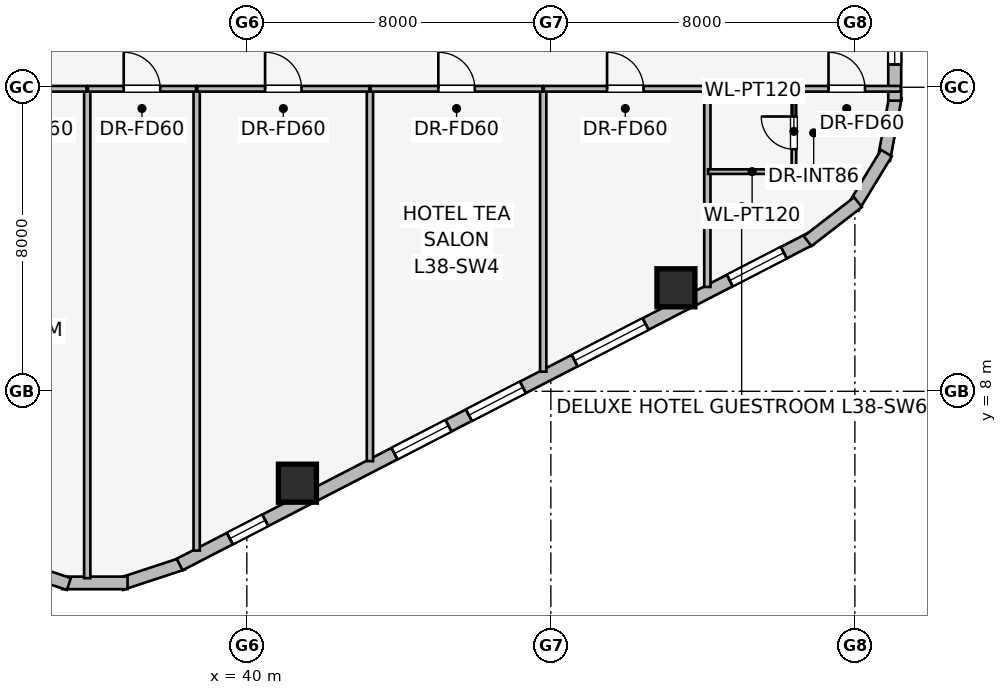
"""IFC4 building model, lengths in metres.
Left out: names, types, materials, properties, quantities, classifications, styles, units other than length and angle.
Written with IfcOpenShell. Run it as: python <this file> out.ifc"""

import sys

from ifc_helpers import new_model, si_unit, direction, frame, frame_2d, origin, origin_2d, place, context, subcontext, project, spatial, rectangle, extrude, element, fill, save


model = new_model("IFC4")
c1 = context("Model", 3, precision=1e-05, world=origin(), true_north=direction((0.0, 1.0)))
c2 = subcontext(c1, "Body", "Model", "MODEL_VIEW")
j1 = project(units=[si_unit("LENGTHUNIT", "METRE"), si_unit("PLANEANGLEUNIT", "RADIAN")], contexts=[c1])
p1 = place(None, origin())
s1 = spatial("IfcSite", under=j1, at=p1, CompositionType="ELEMENT")
p2 = place(p1, origin())
s2 = spatial("IfcBuilding", under=s1, at=p2, CompositionType="ELEMENT")
p3 = place(p2, frame((0.0, 0.0, 142.95)))
s3 = spatial("IfcBuildingStorey", under=s2, at=p3, CompositionType="ELEMENT", Elevation=142.95)
for number, where, z_axis, x_axis in (
    (1, (41.331, 5.582, 0.0), (0.0, 0.0, 1.0), (1.0, 0.0, 0.0)),
    (2, (51.291, 10.723, 0.0), (0.0, 0.0, 1.0), (1.0, 0.0, 0.0)),
):
    element("IfcColumn", number, at=place(p3, frame(where, z_axis=z_axis, x_axis=x_axis)), inside=s3, PredefinedType="COLUMN", context=c2, shape_type="SweptSolid", body=[
        extrude(rectangle(XDim=1.0, YDim=1.0, at=origin_2d()), origin(), (0.0, 0.0, 1.0), 3.45),
    ])
for number, where, z_axis, x_axis in (
    (3, (38.319, 3.468, 0.0), (0.0, 0.0, 1.0), (-0.95, -0.312, 0.0)),
    (4, (36.861, 2.959, 0.0), (0.0, 0.0, 1.0), (-1.0, 0.0, 0.0)),
    (5, (35.317, 2.93, 0.0), (0.0, 0.0, 1.0), (-0.95, 0.312, 0.0)),
):
    element("IfcWall", number, at=place(p3, frame(where, z_axis=z_axis, x_axis=x_axis)), inside=s3, PredefinedType="STANDARD", context=c2, shape_type="SweptSolid", body=[
        extrude(rectangle(XDim=1.722, YDim=0.33, at=frame_2d((0.861, 0.0))), origin(), (0.0, 0.0, 1.0), 3.16),
    ])
p4 = place(p3, frame((54.831, 12.01, 0.0), z_axis=(0.0, 0.0, 1.0), x_axis=(-0.888613612362, -0.458656568606, 0.0)))
e6 = element("IfcWall", 6, at=p4, inside=s3, PredefinedType="STANDARD", context=c2, shape_type="SweptSolid", body=[
    extrude(rectangle(XDim=18.681, YDim=0.34, at=frame_2d((9.34, 0.0))), origin(), (0.0, 0.0, 1.0), 3.16),
])
p5 = place(p4, frame((0.789, 0.0, 0.75)))
e7 = element("IfcOpeningElement", 7, at=p5, cuts=e6, PredefinedType="OPENING", context=c2, shape_type="SweptSolid", body=[
    extrude(rectangle(XDim=1.6, YDim=1.55, at=frame_2d((0.8, 0.775))), frame((0.0, 0.18, 0.0), z_axis=(0.0, -1.0, 0.0), x_axis=(1.0, 0.0, 0.0)), (0.0, 0.0, 1.0), 0.36),
])
p6 = place(p4, frame((4.882, 0.0, 0.75)))
e8 = element("IfcOpeningElement", 8, at=p6, cuts=e6, PredefinedType="OPENING", context=c2, shape_type="SweptSolid", body=[
    extrude(rectangle(XDim=2.1, YDim=1.5, at=frame_2d((1.05, 0.75))), frame((0.0, 0.18, 0.0), z_axis=(0.0, -1.0, 0.0), x_axis=(1.0, 0.0, 0.0)), (0.0, 0.0, 1.0), 0.36),
])
p7 = place(p4, frame((8.515, 0.0, 0.75)))
e9 = element("IfcOpeningElement", 9, at=p7, cuts=e6, PredefinedType="OPENING", context=c2, shape_type="SweptSolid", body=[
    extrude(rectangle(XDim=1.6, YDim=1.55, at=frame_2d((0.8, 0.775))), frame((0.0, 0.18, 0.0), z_axis=(0.0, -1.0, 0.0), x_axis=(1.0, 0.0, 0.0)), (0.0, 0.0, 1.0), 0.36),
])
p8 = place(p4, frame((10.719, 0.0, 0.75)))
e10 = element("IfcOpeningElement", 10, at=p8, cuts=e6, PredefinedType="OPENING", context=c2, shape_type="SweptSolid", body=[
    extrude(rectangle(XDim=1.6, YDim=1.55, at=frame_2d((0.8, 0.775))), frame((0.0, 0.18, 0.0), z_axis=(0.0, -1.0, 0.0), x_axis=(1.0, 0.0, 0.0)), (0.0, 0.0, 1.0), 0.36),
])
p9 = place(p4, frame((16.143, 0.0, 0.75)))
e11 = element("IfcOpeningElement", 11, at=p9, cuts=e6, PredefinedType="OPENING", context=c2, shape_type="SweptSolid", body=[
    extrude(rectangle(XDim=1.05, YDim=1.4, at=frame_2d((0.525, 0.7))), frame((0.0, 0.18, 0.0), z_axis=(0.0, -1.0, 0.0), x_axis=(1.0, 0.0, 0.0)), (0.0, 0.0, 1.0), 0.36),
])
p10 = place(p3, frame((57.068, 15.742, 0.0), z_axis=(0.0, 0.0, 1.0), x_axis=(-0.181984991895, -0.983301308209, 0.0)))
e12 = element("IfcWall", 12, at=p10, inside=s3, PredefinedType="STANDARD", context=c2, shape_type="SweptSolid", body=[
    extrude(rectangle(XDim=1.677, YDim=0.33, at=frame_2d((0.838, 0.0))), origin(), (0.0, 0.0, 1.0), 3.16),
])
p11 = place(p3, frame((56.83, 14.268, 0.0), z_axis=(0.0, 0.0, 1.0), x_axis=(-0.520519429557, -0.853849824883, 0.0)))
e13 = element("IfcWall", 13, at=p11, inside=s3, PredefinedType="STANDARD", context=c2, shape_type="SweptSolid", body=[
    extrude(rectangle(XDim=1.677, YDim=0.33, at=frame_2d((0.839, 0.0))), origin(), (0.0, 0.0, 1.0), 3.16),
])
p12 = place(p3, frame((56.082, 12.976, 0.0), z_axis=(0.0, 0.0, 1.0), x_axis=(-0.790621329885, -0.612305408053, 0.0)))
e14 = element("IfcWall", 14, at=p12, inside=s3, PredefinedType="STANDARD", context=c2, shape_type="SweptSolid", body=[
    extrude(rectangle(XDim=1.676, YDim=0.33, at=frame_2d((0.838, 0.0))), origin(), (0.0, 0.0, 1.0), 3.16),
])
p13 = place(p3, frame((57.048, 32.352, 0.0), z_axis=(0.0, 0.0, 1.0), x_axis=(0.0, -1.0, 0.0)))
e15 = element("IfcWall", 15, at=p13, inside=s3, PredefinedType="STANDARD", context=c2, shape_type="SweptSolid", body=[
    extrude(rectangle(XDim=16.704, YDim=0.34, at=frame_2d((8.352, 0.0))), origin(), (0.0, 0.0, 1.0), 3.16),
])
p14 = place(p13, frame((0.992, 0.0, 0.75)))
e16 = element("IfcOpeningElement", 16, at=p14, cuts=e15, PredefinedType="OPENING", context=c2, shape_type="SweptSolid", body=[
    extrude(rectangle(XDim=1.05, YDim=1.4, at=frame_2d((0.525, 0.7))), frame((0.0, 0.18, 0.0), z_axis=(0.0, -1.0, 0.0), x_axis=(1.0, 0.0, 0.0)), (0.0, 0.0, 1.0), 0.36),
])
p15 = place(p13, frame((4.935, 0.0, 0.75)))
e17 = element("IfcOpeningElement", 17, at=p15, cuts=e15, PredefinedType="OPENING", context=c2, shape_type="SweptSolid", body=[
    extrude(rectangle(XDim=2.1, YDim=1.5, at=frame_2d((1.05, 0.75))), frame((0.0, 0.18, 0.0), z_axis=(0.0, -1.0, 0.0), x_axis=(1.0, 0.0, 0.0)), (0.0, 0.0, 1.0), 0.36),
])
p16 = place(p13, frame((9.919, 0.0, 0.75)))
e18 = element("IfcOpeningElement", 18, at=p16, cuts=e15, PredefinedType="OPENING", context=c2, shape_type="SweptSolid", body=[
    extrude(rectangle(XDim=1.6, YDim=1.55, at=frame_2d((0.8, 0.775))), frame((0.0, 0.18, 0.0), z_axis=(0.0, -1.0, 0.0), x_axis=(1.0, 0.0, 0.0)), (0.0, 0.0, 1.0), 0.36),
])
p17 = place(p13, frame((14.702, 0.0, 0.75)))
e19 = element("IfcOpeningElement", 19, at=p17, cuts=e15, PredefinedType="OPENING", context=c2, shape_type="SweptSolid", body=[
    extrude(rectangle(XDim=1.05, YDim=1.4, at=frame_2d((0.525, 0.7))), frame((0.0, 0.18, 0.0), z_axis=(0.0, -1.0, 0.0), x_axis=(1.0, 0.0, 0.0)), (0.0, 0.0, 1.0), 0.36),
])
p18 = place(p3, frame((35.8, 3.084, 0.0), z_axis=(0.0, 0.0, 1.0), x_axis=(0.0, 1.0, 0.0)))
e20 = element("IfcWall", 20, at=p18, inside=s3, PredefinedType="PARTITIONING", context=c2, shape_type="SweptSolid", body=[
    extrude(rectangle(XDim=12.846, YDim=0.165, at=frame_2d((6.423, 0.0))), origin(), (0.0, 0.0, 1.0), 3.16),
])
p19 = place(p3, frame((38.68, 3.809, 0.0), z_axis=(0.0, 0.0, 1.0), x_axis=(0.0, 1.0, 0.0)))
e21 = element("IfcWall", 21, at=p19, inside=s3, PredefinedType="PARTITIONING", context=c2, shape_type="SweptSolid", body=[
    extrude(rectangle(XDim=12.121, YDim=0.165, at=frame_2d((6.061, 0.0))), origin(), (0.0, 0.0, 1.0), 3.16),
])
p20 = place(p3, frame((43.239, 6.162, 0.0), z_axis=(0.0, 0.0, 1.0), x_axis=(0.0, 1.0, 0.0)))
e22 = element("IfcWall", 22, at=p20, inside=s3, PredefinedType="PARTITIONING", context=c2, shape_type="SweptSolid", body=[
    extrude(rectangle(XDim=9.768, YDim=0.165, at=frame_2d((4.884, 0.0))), origin(), (0.0, 0.0, 1.0), 3.16),
])
p21 = place(p3, frame((47.799, 8.516, 0.0), z_axis=(0.0, 0.0, 1.0), x_axis=(0.0, 1.0, 0.0)))
e23 = element("IfcWall", 23, at=p21, inside=s3, PredefinedType="PARTITIONING", context=c2, shape_type="SweptSolid", body=[
    extrude(rectangle(XDim=7.414, YDim=0.165, at=frame_2d((3.707, 0.0))), origin(), (0.0, 0.0, 1.0), 3.16),
])
p22 = place(p3, frame((52.118, 10.745, 0.0), z_axis=(0.0, 0.0, 1.0), x_axis=(0.0, 1.0, 0.0)))
e24 = element("IfcWall", 24, at=p22, inside=s3, PredefinedType="PARTITIONING", context=c2, shape_type="SweptSolid", body=[
    extrude(rectangle(XDim=5.185, YDim=0.165, at=frame_2d((2.592, 0.0))), origin(), (0.0, 0.0, 1.0), 3.16),
])
p23 = place(p3, frame((32.85, 15.96, 0.0), z_axis=(0.0, 0.0, 1.0), x_axis=(1.0, 0.0, 0.0)))
e25 = element("IfcWall", 25, at=p23, inside=s3, PredefinedType="PARTITIONING", context=c2, shape_type="SweptSolid", body=[
    extrude(rectangle(XDim=2.932, YDim=0.15, at=frame_2d((1.466, 0.0))), origin(), (0.0, 0.0, 1.0), 3.16),
])
p24 = place(p23, frame((0.986, 0.0, 0.0)))
e26 = element("IfcOpeningElement", 26, at=p24, cuts=e25, PredefinedType="OPENING", context=c2, shape_type="SweptSolid", body=[
    extrude(rectangle(XDim=0.96, YDim=2.0, at=frame_2d((0.48, 1.0))), frame((0.0, 0.085, 0.0), z_axis=(0.0, -1.0, 0.0), x_axis=(1.0, 0.0, 0.0)), (0.0, 0.0, 1.0), 0.17),
])
p25 = place(p3, frame((35.818, 15.96, 0.0), z_axis=(0.0, 0.0, 1.0), x_axis=(1.0, 0.0, 0.0)))
e27 = element("IfcWall", 27, at=p25, inside=s3, PredefinedType="PARTITIONING", context=c2, shape_type="SweptSolid", body=[
    extrude(rectangle(XDim=2.844, YDim=0.15, at=frame_2d((1.422, 0.0))), origin(), (0.0, 0.0, 1.0), 3.16),
])
p26 = place(p25, frame((0.942, 0.0, 0.0)))
e28 = element("IfcOpeningElement", 28, at=p26, cuts=e27, PredefinedType="OPENING", context=c2, shape_type="SweptSolid", body=[
    extrude(rectangle(XDim=0.96, YDim=2.0, at=frame_2d((0.48, 1.0))), frame((0.0, 0.085, 0.0), z_axis=(0.0, -1.0, 0.0), x_axis=(1.0, 0.0, 0.0)), (0.0, 0.0, 1.0), 0.17),
])
p27 = place(p3, frame((38.698, 15.96, 0.0), z_axis=(0.0, 0.0, 1.0), x_axis=(1.0, 0.0, 0.0)))
e29 = element("IfcWall", 29, at=p27, inside=s3, PredefinedType="PARTITIONING", context=c2, shape_type="SweptSolid", body=[
    extrude(rectangle(XDim=4.523, YDim=0.15, at=frame_2d((2.261, 0.0))), origin(), (0.0, 0.0, 1.0), 3.16),
])
p28 = place(p27, frame((1.782, 0.0, 0.0)))
e30 = element("IfcOpeningElement", 30, at=p28, cuts=e29, PredefinedType="OPENING", context=c2, shape_type="SweptSolid", body=[
    extrude(rectangle(XDim=0.96, YDim=2.0, at=frame_2d((0.48, 1.0))), frame((0.0, 0.085, 0.0), z_axis=(0.0, -1.0, 0.0), x_axis=(1.0, 0.0, 0.0)), (0.0, 0.0, 1.0), 0.17),
])
p29 = place(p3, frame((43.257, 15.96, 0.0), z_axis=(0.0, 0.0, 1.0), x_axis=(1.0, 0.0, 0.0)))
e31 = element("IfcWall", 31, at=p29, inside=s3, PredefinedType="PARTITIONING", context=c2, shape_type="SweptSolid", body=[
    extrude(rectangle(XDim=4.524, YDim=0.15, at=frame_2d((2.262, 0.0))), origin(), (0.0, 0.0, 1.0), 3.16),
])
p30 = place(p29, frame((1.782, 0.0, 0.0)))
e32 = element("IfcOpeningElement", 32, at=p30, cuts=e31, PredefinedType="OPENING", context=c2, shape_type="SweptSolid", body=[
    extrude(rectangle(XDim=0.96, YDim=2.0, at=frame_2d((0.48, 1.0))), frame((0.0, 0.085, 0.0), z_axis=(0.0, -1.0, 0.0), x_axis=(1.0, 0.0, 0.0)), (0.0, 0.0, 1.0), 0.17),
])
p31 = place(p3, frame((47.817, 15.96, 0.0), z_axis=(0.0, 0.0, 1.0), x_axis=(1.0, 0.0, 0.0)))
e33 = element("IfcWall", 33, at=p31, inside=s3, PredefinedType="PARTITIONING", context=c2, shape_type="SweptSolid", body=[
    extrude(rectangle(XDim=4.283, YDim=0.15, at=frame_2d((2.142, 0.0))), origin(), (0.0, 0.0, 1.0), 3.16),
])
p32 = place(p31, frame((1.662, 0.0, 0.0)))
e34 = element("IfcOpeningElement", 34, at=p32, cuts=e33, PredefinedType="OPENING", context=c2, shape_type="SweptSolid", body=[
    extrude(rectangle(XDim=0.96, YDim=2.0, at=frame_2d((0.48, 1.0))), frame((0.0, 0.085, 0.0), z_axis=(0.0, -1.0, 0.0), x_axis=(1.0, 0.0, 0.0)), (0.0, 0.0, 1.0), 0.17),
])
p33 = place(p3, frame((54.396, 13.72, 0.0), z_axis=(0.0, 0.0, 1.0), x_axis=(0.0, 1.0, 0.0)))
e35 = element("IfcWall", 35, at=p33, inside=s3, PredefinedType="PARTITIONING", context=c2, shape_type="SweptSolid", body=[
    extrude(rectangle(XDim=2.24, YDim=0.12, at=frame_2d((1.12, 0.0))), origin(), (0.0, 0.0, 1.0), 3.16),
])
p34 = place(p33, frame((0.65, 0.0, 0.0)))
e36 = element("IfcOpeningElement", 36, at=p34, cuts=e35, PredefinedType="OPENING", context=c2, shape_type="SweptSolid", body=[
    extrude(rectangle(XDim=0.86, YDim=2.0, at=frame_2d((0.43, 1.0))), frame((0.0, 0.07, 0.0), z_axis=(0.0, -1.0, 0.0), x_axis=(1.0, 0.0, 0.0)), (0.0, 0.0, 1.0), 0.14),
])
p35 = place(p3, frame((52.136, 13.78, 0.0), z_axis=(0.0, 0.0, 1.0), x_axis=(1.0, 0.0, 0.0)))
e37 = element("IfcWall", 37, at=p35, inside=s3, PredefinedType="PARTITIONING", context=c2, shape_type="SweptSolid", body=[
    extrude(rectangle(XDim=2.32, YDim=0.12, at=frame_2d((1.16, 0.0))), origin(), (0.0, 0.0, 1.0), 3.16),
])
p36 = place(p3, frame((52.136, 15.96, 0.0), z_axis=(0.0, 0.0, 1.0), x_axis=(1.0, 0.0, 0.0)))
e38 = element("IfcWall", 38, at=p36, inside=s3, PredefinedType="PARTITIONING", context=c2, shape_type="SweptSolid", body=[
    extrude(rectangle(XDim=5.072, YDim=0.15, at=frame_2d((2.536, 0.0))), origin(), (0.0, 0.0, 1.0), 3.16),
])
p37 = place(p36, frame((3.17, 0.0, 0.0)))
e39 = element("IfcOpeningElement", 39, at=p37, cuts=e38, PredefinedType="OPENING", context=c2, shape_type="SweptSolid", body=[
    extrude(rectangle(XDim=0.96, YDim=2.0, at=frame_2d((0.48, 1.0))), frame((0.0, 0.085, 0.0), z_axis=(0.0, -1.0, 0.0), x_axis=(1.0, 0.0, 0.0)), (0.0, 0.0, 1.0), 0.17),
])
p38 = place(p5, origin())
e40 = element("IfcWindow", 40, at=p38, inside=s3, PartitioningType="SINGLE_PANEL", PredefinedType="WINDOW", context=c2, shape_type="SweptSolid", body=[
    extrude(rectangle(XDim=1.6, YDim=1.55, at=frame_2d((0.8, 0.775))), frame((0.0, 0.03, 0.0), z_axis=(0.0, -1.0, 0.0), x_axis=(1.0, 0.0, 0.0)), (0.0, 0.0, 1.0), 0.06),
])
fill(e7, e40)
p39 = place(p6, origin())
e41 = element("IfcWindow", 41, at=p39, inside=s3, PartitioningType="SINGLE_PANEL", PredefinedType="WINDOW", context=c2, shape_type="SweptSolid", body=[
    extrude(rectangle(XDim=2.1, YDim=1.5, at=frame_2d((1.05, 0.75))), frame((0.0, 0.03, 0.0), z_axis=(0.0, -1.0, 0.0), x_axis=(1.0, 0.0, 0.0)), (0.0, 0.0, 1.0), 0.06),
])
fill(e8, e41)
p40 = place(p7, origin())
e42 = element("IfcWindow", 42, at=p40, inside=s3, PartitioningType="SINGLE_PANEL", PredefinedType="WINDOW", context=c2, shape_type="SweptSolid", body=[
    extrude(rectangle(XDim=1.6, YDim=1.55, at=frame_2d((0.8, 0.775))), frame((0.0, 0.03, 0.0), z_axis=(0.0, -1.0, 0.0), x_axis=(1.0, 0.0, 0.0)), (0.0, 0.0, 1.0), 0.06),
])
fill(e9, e42)
p41 = place(p8, origin())
e43 = element("IfcWindow", 43, at=p41, inside=s3, PartitioningType="SINGLE_PANEL", PredefinedType="WINDOW", context=c2, shape_type="SweptSolid", body=[
    extrude(rectangle(XDim=1.6, YDim=1.55, at=frame_2d((0.8, 0.775))), frame((0.0, 0.03, 0.0), z_axis=(0.0, -1.0, 0.0), x_axis=(1.0, 0.0, 0.0)), (0.0, 0.0, 1.0), 0.06),
])
fill(e10, e43)
p42 = place(p9, origin())
e44 = element("IfcWindow", 44, at=p42, inside=s3, PartitioningType="SINGLE_PANEL", PredefinedType="WINDOW", context=c2, shape_type="SweptSolid", body=[
    extrude(rectangle(XDim=1.05, YDim=1.4, at=frame_2d((0.525, 0.7))), frame((0.0, 0.03, 0.0), z_axis=(0.0, -1.0, 0.0), x_axis=(1.0, 0.0, 0.0)), (0.0, 0.0, 1.0), 0.06),
])
fill(e11, e44)
p43 = place(p17, origin())
e45 = element("IfcWindow", 45, at=p43, inside=s3, PartitioningType="SINGLE_PANEL", PredefinedType="WINDOW", context=c2, shape_type="SweptSolid", body=[
    extrude(rectangle(XDim=1.05, YDim=1.4, at=frame_2d((0.525, 0.7))), frame((0.0, 0.03, 0.0), z_axis=(0.0, -1.0, 0.0), x_axis=(1.0, 0.0, 0.0)), (0.0, 0.0, 1.0), 0.06),
])
fill(e19, e45)
p44 = place(p26, origin())
e46 = element("IfcDoor", 46, at=p44, inside=s3, OperationType="SINGLE_SWING_LEFT", PredefinedType="DOOR", context=c2, shape_type="SweptSolid", body=[
    extrude(rectangle(XDim=0.96, YDim=2.0, at=frame_2d((0.48, 1.0))), frame((0.0, 0.025, 0.0), z_axis=(0.0, -1.0, 0.0), x_axis=(1.0, 0.0, 0.0)), (0.0, 0.0, 1.0), 0.05),
])
fill(e28, e46)
p45 = place(p28, origin())
e47 = element("IfcDoor", 47, at=p45, inside=s3, OperationType="SINGLE_SWING_LEFT", PredefinedType="DOOR", context=c2, shape_type="SweptSolid", body=[
    extrude(rectangle(XDim=0.96, YDim=2.0, at=frame_2d((0.48, 1.0))), frame((0.0, 0.025, 0.0), z_axis=(0.0, -1.0, 0.0), x_axis=(1.0, 0.0, 0.0)), (0.0, 0.0, 1.0), 0.05),
])
fill(e30, e47)
p46 = place(p30, origin())
e48 = element("IfcDoor", 48, at=p46, inside=s3, OperationType="SINGLE_SWING_LEFT", PredefinedType="DOOR", context=c2, shape_type="SweptSolid", body=[
    extrude(rectangle(XDim=0.96, YDim=2.0, at=frame_2d((0.48, 1.0))), frame((0.0, 0.025, 0.0), z_axis=(0.0, -1.0, 0.0), x_axis=(1.0, 0.0, 0.0)), (0.0, 0.0, 1.0), 0.05),
])
fill(e32, e48)
p47 = place(p32, origin())
e49 = element("IfcDoor", 49, at=p47, inside=s3, OperationType="SINGLE_SWING_LEFT", PredefinedType="DOOR", context=c2, shape_type="SweptSolid", body=[
    extrude(rectangle(XDim=0.96, YDim=2.0, at=frame_2d((0.48, 1.0))), frame((0.0, 0.025, 0.0), z_axis=(0.0, -1.0, 0.0), x_axis=(1.0, 0.0, 0.0)), (0.0, 0.0, 1.0), 0.05),
])
fill(e34, e49)
p48 = place(p34, origin())
e50 = element("IfcDoor", 50, at=p48, inside=s3, OperationType="SINGLE_SWING_RIGHT", PredefinedType="DOOR", context=c2, shape_type="SweptSolid", body=[
    extrude(rectangle(XDim=0.86, YDim=2.0, at=frame_2d((0.43, 1.0))), frame((0.0, 0.025, 0.0), z_axis=(0.0, -1.0, 0.0), x_axis=(1.0, 0.0, 0.0)), (0.0, 0.0, 1.0), 0.05),
])
fill(e36, e50)
p49 = place(p37, origin())
e51 = element("IfcDoor", 51, at=p49, inside=s3, OperationType="SINGLE_SWING_LEFT", PredefinedType="DOOR", context=c2, shape_type="SweptSolid", body=[
    extrude(rectangle(XDim=0.96, YDim=2.0, at=frame_2d((0.48, 1.0))), frame((0.0, 0.025, 0.0), z_axis=(0.0, -1.0, 0.0), x_axis=(1.0, 0.0, 0.0)), (0.0, 0.0, 1.0), 0.05),
])
fill(e39, e51)
save(model, sys.argv[1])
